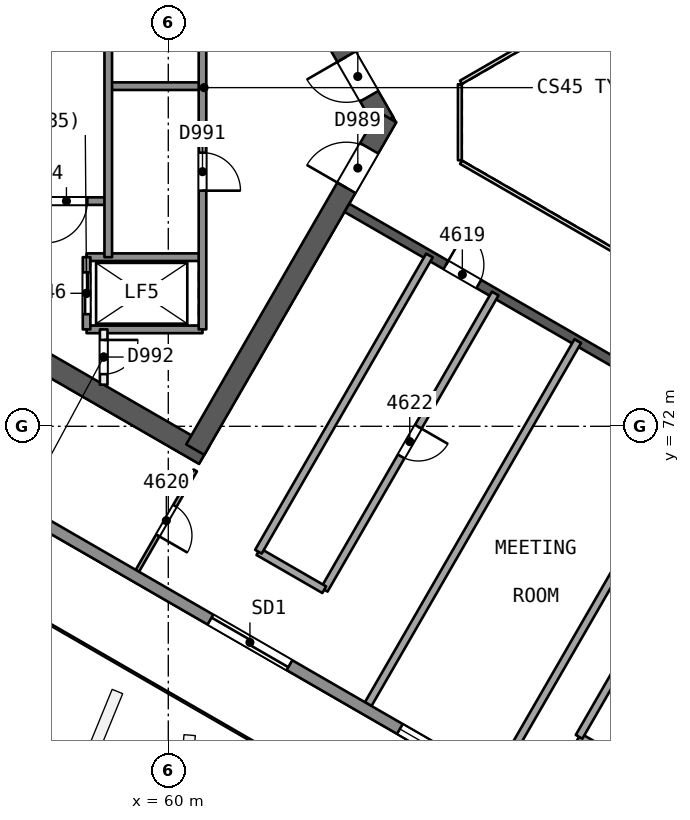
"""IFC4 building model, lengths in metres.
Left out: names, types, materials, properties, quantities, classifications, styles, units other than length and angle.
Written with IfcOpenShell. Run it as: python <this file> out.ifc"""

import sys

from ifc_helpers import new_model, si_unit, direction, frame, frame_2d, origin, place, context, subcontext, project, spatial, rectangle, extrude, element, fill, save


model = new_model("IFC4")
c1 = context("Model", 3, precision=1e-05, world=origin(), true_north=direction((0.0, 1.0)))
c2 = subcontext(c1, "Body", "Model", "MODEL_VIEW")
j1 = project(units=[si_unit("LENGTHUNIT", "METRE"), si_unit("PLANEANGLEUNIT", "RADIAN")], contexts=[c1])
p1 = place(None, origin())
s1 = spatial("IfcSite", under=j1, at=p1, CompositionType="ELEMENT")
p2 = place(p1, origin())
s2 = spatial("IfcBuilding", under=s1, at=p2, CompositionType="ELEMENT")
p3 = place(p2, frame((0.0, 0.0, 189.6)))
s3 = spatial("IfcBuildingStorey", under=s2, at=p3, CompositionType="ELEMENT", Elevation=189.6)
p4 = place(p3, frame((65.682, 80.0, 0.0), z_axis=(0.0, 0.0, 1.0), x_axis=(-0.500000202252, 0.866025287014, 0.0)))
e1 = element("IfcWall", 1, at=p4, inside=s3, PredefinedType="SHEAR", context=c2, shape_type="SweptSolid", body=[
    extrude(rectangle(XDim=10.221, YDim=0.55, at=frame_2d((5.111, 0.0))), origin(), (0.0, 0.0, 1.0), 3.7),
])
p5 = place(p4, frame((0.791, 0.0, 0.0)))
e2 = element("IfcOpeningElement", 2, at=p5, cuts=e1, PredefinedType="OPENING", context=c2, shape_type="SweptSolid", body=[
    extrude(rectangle(XDim=1.2, YDim=2.1, at=frame_2d((0.6, 1.05))), frame((0.0, 0.286, 0.0), z_axis=(0.0, -1.0, 0.0), x_axis=(1.0, 0.0, 0.0)), (0.0, 0.0, 1.0), 0.571),
])
p6 = place(p3, frame((60.709, 88.614, 0.0), z_axis=(0.0, 0.0, 1.0), x_axis=(-0.866020164116, -0.500009075263, 0.0)))
e3 = element("IfcWall", 3, at=p6, inside=s3, PredefinedType="SHEAR", context=c2, shape_type="SweptSolid", body=[
    extrude(rectangle(XDim=14.058, YDim=0.55, at=frame_2d((7.029, 0.0))), origin(), (0.0, 0.0, 1.0), 3.7),
])
p7 = place(p3, frame((48.672, 78.336, 0.0), z_axis=(0.0, 0.0, 1.0), x_axis=(0.866023530946, -0.500003243837, 0.0)))
e4 = element("IfcWall", 4, at=p7, inside=s3, PredefinedType="SHEAR", context=c2, shape_type="SweptSolid", body=[
    extrude(rectangle(XDim=14.175, YDim=0.55, at=frame_2d((7.087, 0.0))), origin(), (0.0, 0.0, 1.0), 3.7),
])
p8 = place(p3, frame((60.709, 71.386, 0.0), z_axis=(0.0, 0.0, 1.0), x_axis=(0.500015938302, 0.866016201606, 0.0)))
e5 = element("IfcWall", 5, at=p8, inside=s3, PredefinedType="SHEAR", context=c2, shape_type="SweptSolid", body=[
    extrude(rectangle(XDim=10.105, YDim=0.55, at=frame_2d((5.053, 0.0))), origin(), (0.0, 0.0, 1.0), 3.7),
])
p9 = place(p8, frame((7.955, 0.0, 0.0)))
e6 = element("IfcOpeningElement", 6, at=p9, cuts=e5, PredefinedType="OPENING", context=c2, shape_type="SweptSolid", body=[
    extrude(rectangle(XDim=1.2, YDim=2.1, at=frame_2d((0.6, 1.05))), frame((0.0, 0.286, 0.0), z_axis=(0.0, -1.0, 0.0), x_axis=(1.0, 0.0, 0.0)), (0.0, 0.0, 1.0), 0.571),
])
p10 = place(p3, frame((64.7, 77.748, 0.0), z_axis=(0.0, 0.0, 1.0), x_axis=(0.866026492143, -0.499998114903, 0.0)))
e7 = element("IfcWall", 7, at=p10, inside=s3, PredefinedType="SHEAR", context=c2, shape_type="SweptSolid", body=[
    extrude(rectangle(XDim=15.588, YDim=0.25, at=frame_2d((7.794, 0.0))), origin(), (0.0, 0.0, 1.0), 3.25),
])
p11 = place(p10, frame((3.007, 0.0, 0.0)))
e8 = element("IfcOpeningElement", 8, at=p11, cuts=e7, PredefinedType="OPENING", context=c2, shape_type="SweptSolid", body=[
    extrude(rectangle(XDim=1.0, YDim=2.1, at=frame_2d((0.5, 1.05))), frame((0.0, 0.135, 0.0), z_axis=(0.0, -1.0, 0.0), x_axis=(1.0, 0.0, 0.0)), (0.0, 0.0, 1.0), 0.271),
])
p12 = place(p10, frame((8.363, 0.0, 0.0)))
e9 = element("IfcOpeningElement", 9, at=p12, cuts=e7, PredefinedType="OPENING", context=c2, shape_type="SweptSolid", body=[
    extrude(rectangle(XDim=1.2, YDim=2.4, at=frame_2d((0.6, 1.2))), frame((0.0, 0.135, 0.0), z_axis=(0.0, -1.0, 0.0), x_axis=(1.0, 0.0, 0.0)), (0.0, 0.0, 1.0), 0.271),
])
p13 = place(p10, frame((12.75, 0.0, 0.0)))
e10 = element("IfcOpeningElement", 10, at=p13, cuts=e7, PredefinedType="OPENING", context=c2, shape_type="SweptSolid", body=[
    extrude(rectangle(XDim=1.0, YDim=2.1, at=frame_2d((0.5, 1.05))), frame((0.0, 0.135, 0.0), z_axis=(0.0, -1.0, 0.0), x_axis=(1.0, 0.0, 0.0)), (0.0, 0.0, 1.0), 0.271),
])
p14 = place(p3, frame((60.71, 70.838, 0.0), z_axis=(0.0, 0.0, 1.0), x_axis=(-0.499978833458, -0.866037623948, 0.0)))
e11 = element("IfcWall", 11, at=p14, inside=s3, PredefinedType="PARTITIONING", context=c2, shape_type="SweptSolid", body=[
    extrude(rectangle(XDim=3.05, YDim=0.1, at=frame_2d((1.525, 0.0))), origin(), (0.0, 0.0, 1.0), 3.25),
])
p15 = place(p14, frame((1.075, 0.0, 0.0)))
e12 = element("IfcOpeningElement", 12, at=p15, cuts=e11, PredefinedType="OPENING", context=c2, shape_type="SweptSolid", body=[
    extrude(rectangle(XDim=0.9, YDim=2.1, at=frame_2d((0.45, 1.05))), frame((0.0, 0.061, 0.0), z_axis=(0.0, -1.0, 0.0), x_axis=(1.0, 0.0, 0.0)), (0.0, 0.0, 1.0), 0.121),
])
p16 = place(p3, frame((68.604, 75.495, 0.0), z_axis=(0.0, 0.0, 1.0), x_axis=(-0.5000018851, -0.866024315419, 0.0)))
e13 = element("IfcWall", 13, at=p16, inside=s3, PredefinedType="PARTITIONING", context=c2, shape_type="SweptSolid", body=[
    extrude(rectangle(XDim=9.0, YDim=0.2, at=frame_2d((4.5, 0.0))), origin(), (0.0, 0.0, 1.0), 3.25),
])
p17 = place(p16, frame((4.05, 0.0, 0.0)))
e14 = element("IfcOpeningElement", 14, at=p17, cuts=e13, PredefinedType="OPENING", context=c2, shape_type="SweptSolid", body=[
    extrude(rectangle(XDim=0.9, YDim=2.1, at=frame_2d((0.45, 1.05))), frame((0.0, 0.11, 0.0), z_axis=(0.0, -1.0, 0.0), x_axis=(1.0, 0.0, 0.0)), (0.0, 0.0, 1.0), 0.221),
])
p18 = place(p3, frame((64.104, 67.7, 0.0), z_axis=(0.0, 0.0, 1.0), x_axis=(-0.866010750942, 0.50002537861, 0.0)))
e15 = element("IfcWall", 15, at=p18, inside=s3, PredefinedType="PARTITIONING", context=c2, shape_type="SweptSolid", body=[
    extrude(rectangle(XDim=2.0, YDim=0.2, at=frame_2d((1.0, 0.0))), origin(), (0.0, 0.0, 1.0), 3.25),
])
p19 = place(p3, frame((62.372, 68.7, 0.0), z_axis=(0.0, 0.0, 1.0), x_axis=(0.5000018851, 0.866024315419, 0.0)))
e16 = element("IfcWall", 16, at=p19, inside=s3, PredefinedType="PARTITIONING", context=c2, shape_type="SweptSolid", body=[
    extrude(rectangle(XDim=9.0, YDim=0.2, at=frame_2d((4.5, 0.0))), origin(), (0.0, 0.0, 1.0), 3.25),
])
for number, where, z_axis, x_axis in (
    (17, (65.26, 64.69, 0.0), (0.0, 0.0, 1.0), (0.5, 0.866, 0.0)),
    (18, (68.635, 62.741, 0.0), (0.0, 0.0, 1.0), (0.5, 0.866, 0.0)),
):
    element("IfcWall", number, at=place(p3, frame(where, z_axis=z_axis, x_axis=x_axis)), inside=s3, PredefinedType="PARTITIONING", context=c2, shape_type="SweptSolid", body=[
        extrude(rectangle(XDim=11.029, YDim=0.2, at=frame_2d((5.514, 0.0))), origin(), (0.0, 0.0, 1.0), 3.25),
    ])
p20 = place(p3, frame((72.541, 62.829, 0.0), z_axis=(0.0, 0.0, 1.0), x_axis=(-0.866010750942, 0.50002537861, 0.0)))
e19 = element("IfcWall", 19, at=p20, inside=s3, PredefinedType="PARTITIONING", context=c2, shape_type="SweptSolid", body=[
    extrude(rectangle(XDim=2.0, YDim=0.2, at=frame_2d((1.0, 0.0))), origin(), (0.0, 0.0, 1.0), 3.25),
])
p21 = place(p3, frame((70.809, 63.829, 0.0), z_axis=(0.0, 0.0, 1.0), x_axis=(0.5000018851, 0.866024315419, 0.0)))
e20 = element("IfcWall", 20, at=p21, inside=s3, PredefinedType="PARTITIONING", context=c2, shape_type="SweptSolid", body=[
    extrude(rectangle(XDim=9.0, YDim=0.2, at=frame_2d((4.5, 0.0))), origin(), (0.0, 0.0, 1.0), 3.25),
])
p22 = place(p3, frame((88.621, 51.031, 0.0), z_axis=(0.0, 0.0, 1.0), x_axis=(-0.866025007541, 0.500000686313, 0.0)))
e21 = element("IfcWall", 21, at=p22, inside=s3, PredefinedType="SOLIDWALL", context=c2, shape_type="SweptSolid", body=[
    extrude(rectangle(XDim=52.562, YDim=0.3, at=frame_2d((26.281, 0.0))), origin(), (0.0, 0.0, 1.0), 3.25),
])
p23 = place(p22, frame((29.367, 0.0, 0.0)))
e22 = element("IfcOpeningElement", 22, at=p23, cuts=e21, PredefinedType="OPENING", context=c2, shape_type="SweptSolid", body=[
    extrude(rectangle(XDim=2.4, YDim=2.4, at=frame_2d((1.2, 1.2))), frame((0.0, 0.161, 0.0), z_axis=(0.0, -1.0, 0.0), x_axis=(1.0, 0.0, 0.0)), (0.0, 0.0, 1.0), 0.321),
])
p24 = place(p22, frame((40.864, 0.0, 0.0)))
e23 = element("IfcOpeningElement", 23, at=p24, cuts=e21, PredefinedType="OPENING", context=c2, shape_type="SweptSolid", body=[
    extrude(rectangle(XDim=2.4, YDim=2.4, at=frame_2d((1.2, 1.2))), frame((0.0, 0.161, 0.0), z_axis=(0.0, -1.0, 0.0), x_axis=(1.0, 0.0, 0.0)), (0.0, 0.0, 1.0), 0.321),
])
p25 = place(p22, frame((19.625, 0.0, 0.0)))
e24 = element("IfcOpeningElement", 24, at=p25, cuts=e21, PredefinedType="OPENING", context=c2, shape_type="SweptSolid", body=[
    extrude(rectangle(XDim=2.4, YDim=2.4, at=frame_2d((1.2, 1.2))), frame((0.0, 0.161, 0.0), z_axis=(0.0, -1.0, 0.0), x_axis=(1.0, 0.0, 0.0)), (0.0, 0.0, 1.0), 0.321),
])
p26 = place(p22, frame((9.277, 0.0, 0.0)))
e25 = element("IfcOpeningElement", 25, at=p26, cuts=e21, PredefinedType="OPENING", context=c2, shape_type="SweptSolid", body=[
    extrude(rectangle(XDim=2.4, YDim=2.4, at=frame_2d((1.2, 1.2))), frame((0.0, 0.161, 0.0), z_axis=(0.0, -1.0, 0.0), x_axis=(1.0, 0.0, 0.0)), (0.0, 0.0, 1.0), 0.321),
])
p27 = place(p22, frame((24.212, 0.0, 0.9)))
e26 = element("IfcOpeningElement", 26, at=p27, cuts=e21, PredefinedType="OPENING", context=c2, shape_type="SweptSolid", body=[
    extrude(rectangle(XDim=1.8, YDim=1.5, at=frame_2d((0.9, 0.75))), frame((0.0, 0.161, 0.0), z_axis=(0.0, -1.0, 0.0), x_axis=(1.0, 0.0, 0.0)), (0.0, 0.0, 1.0), 0.321),
])
p28 = place(p3, frame((60.9, 80.95, 0.0), z_axis=(0.0, 0.0, 1.0), x_axis=(-1.0, 0.0, 0.0)))
e27 = element("IfcWall", 27, at=p28, inside=s3, PredefinedType="SOLIDWALL", context=c2, shape_type="SweptSolid", body=[
    extrude(rectangle(XDim=2.48, YDim=0.2, at=frame_2d((1.24, 0.0))), origin(), (0.0, 0.0, 1.0), 3.25),
])
p29 = place(p3, frame((58.42, 77.925, 0.0), z_axis=(0.0, 0.0, 1.0), x_axis=(-1.0, 0.0, 0.0)))
e28 = element("IfcWall", 28, at=p29, inside=s3, PredefinedType="SOLIDWALL", context=c2, shape_type="SweptSolid", body=[
    extrude(rectangle(XDim=7.7, YDim=0.2, at=frame_2d((3.85, 0.0))), origin(), (0.0, 0.0, 1.0), 3.25),
])
p30 = place(p29, frame((0.55, 0.0, 0.0)))
e29 = element("IfcOpeningElement", 29, at=p30, cuts=e28, PredefinedType="OPENING", context=c2, shape_type="SweptSolid", body=[
    extrude(rectangle(XDim=1.1, YDim=2.1, at=frame_2d((0.55, 1.05))), frame((0.0, 0.11, 0.0), z_axis=(0.0, -1.0, 0.0), x_axis=(1.0, 0.0, 0.0)), (0.0, 0.0, 1.0), 0.221),
])
for number, where, z_axis, x_axis in (
    (30, (60.9, 76.45, 0.0), (0.0, 0.0, 1.0), (-1.0, 0.0, 0.0)),
    (31, (60.9, 74.55, 0.0), (0.0, 0.0, 1.0), (-1.0, 0.0, 0.0)),
):
    element("IfcWall", number, at=place(p3, frame(where, z_axis=z_axis, x_axis=x_axis)), inside=s3, PredefinedType="SOLIDWALL", context=c2, shape_type="SweptSolid", body=[
        extrude(rectangle(XDim=3.05, YDim=0.2, at=frame_2d((1.525, 0.0))), origin(), (0.0, 0.0, 1.0), 3.25),
    ])
p31 = place(p3, frame((60.9, 85.45, 0.0), z_axis=(0.0, 0.0, 1.0), x_axis=(0.0, -1.0, 0.0)))
e32 = element("IfcWall", 32, at=p31, inside=s3, PredefinedType="SOLIDWALL", context=c2, shape_type="SweptSolid", body=[
    extrude(rectangle(XDim=10.9, YDim=0.2, at=frame_2d((5.45, 0.0))), origin(), (0.0, 0.0, 1.0), 3.25),
])
p32 = place(p31, frame((1.75, 0.0, 0.0)))
e33 = element("IfcOpeningElement", 33, at=p32, cuts=e32, PredefinedType="OPENING", context=c2, shape_type="SweptSolid", body=[
    extrude(rectangle(XDim=1.0, YDim=2.1, at=frame_2d((0.5, 1.05))), frame((0.0, 0.11, 0.0), z_axis=(0.0, -1.0, 0.0), x_axis=(1.0, 0.0, 0.0)), (0.0, 0.0, 1.0), 0.221),
])
p33 = place(p31, frame((6.25, 0.0, 0.0)))
e34 = element("IfcOpeningElement", 34, at=p33, cuts=e32, PredefinedType="OPENING", context=c2, shape_type="SweptSolid", body=[
    extrude(rectangle(XDim=1.0, YDim=2.1, at=frame_2d((0.5, 1.05))), frame((0.0, 0.11, 0.0), z_axis=(0.0, -1.0, 0.0), x_axis=(1.0, 0.0, 0.0)), (0.0, 0.0, 1.0), 0.221),
])
p34 = place(p3, frame((58.42, 86.974, 0.0), z_axis=(0.0, 0.0, 1.0), x_axis=(0.0, -1.0, 0.0)))
e35 = element("IfcWall", 35, at=p34, inside=s3, PredefinedType="SOLIDWALL", context=c2, shape_type="SweptSolid", body=[
    extrude(rectangle(XDim=10.524, YDim=0.2, at=frame_2d((5.262, 0.0))), origin(), (0.0, 0.0, 1.0), 3.25),
])
p35 = place(p34, frame((0.312, 0.0, 0.0)))
e36 = element("IfcOpeningElement", 36, at=p35, cuts=e35, PredefinedType="OPENING", context=c2, shape_type="SweptSolid", body=[
    extrude(rectangle(XDim=0.9, YDim=2.1, at=frame_2d((0.45, 1.05))), frame((0.0, 0.11, 0.0), z_axis=(0.0, -1.0, 0.0), x_axis=(1.0, 0.0, 0.0)), (0.0, 0.0, 1.0), 0.221),
])
p36 = place(p3, frame((58.3, 74.55, 0.0), z_axis=(0.0, 0.0, 1.0), x_axis=(0.0, -1.0, 0.0)))
e37 = element("IfcWall", 37, at=p36, inside=s3, PredefinedType="PARTITIONING", context=c2, shape_type="SweptSolid", body=[
    extrude(rectangle(XDim=1.455, YDim=0.2, at=frame_2d((0.728, 0.0))), origin(), (0.0, 0.0, 1.0), 3.25),
])
p37 = place(p36, frame((0.278, 0.0, 0.0)))
e38 = element("IfcOpeningElement", 38, at=p37, cuts=e37, PredefinedType="OPENING", context=c2, shape_type="SweptSolid", body=[
    extrude(rectangle(XDim=0.9, YDim=2.1, at=frame_2d((0.45, 1.05))), frame((0.0, 0.11, 0.0), z_axis=(0.0, -1.0, 0.0), x_axis=(1.0, 0.0, 0.0)), (0.0, 0.0, 1.0), 0.221),
])
p38 = place(p3, frame((57.85, 76.45, 0.0), z_axis=(0.0, 0.0, 1.0), x_axis=(0.0, -1.0, 0.0)))
e39 = element("IfcWall", 39, at=p38, inside=s3, PredefinedType="SOLIDWALL", context=c2, shape_type="SweptSolid", body=[
    extrude(rectangle(XDim=1.9, YDim=0.2, at=frame_2d((0.95, 0.0))), origin(), (0.0, 0.0, 1.0), 3.25),
])
p39 = place(p38, frame((0.4, 0.0, 0.0)))
e40 = element("IfcOpeningElement", 40, at=p39, cuts=e39, PredefinedType="OPENING", context=c2, shape_type="SweptSolid", body=[
    extrude(rectangle(XDim=1.1, YDim=2.1, at=frame_2d((0.55, 1.05))), frame((0.0, 0.11, 0.0), z_axis=(0.0, -1.0, 0.0), x_axis=(1.0, 0.0, 0.0)), (0.0, 0.0, 1.0), 0.221),
])
p40 = place(p3, frame((77.738, 86.846, 0.0), z_axis=(0.0, 0.0, 1.0), x_axis=(-0.866026658274, -0.499997827154, 0.0)))
e41 = element("IfcWall", 41, at=p40, inside=s3, PredefinedType="PARTITIONING", context=c2, shape_type="SweptSolid", body=[
    extrude(rectangle(XDim=11.588, YDim=0.1, at=frame_2d((5.794, 0.0))), origin(), (0.0, 0.0, 1.0), 3.25),
])
p41 = place(p3, frame((67.672, 81.0, 0.0), z_axis=(0.0, 0.0, 1.0), x_axis=(0.0, -1.0, 0.0)))
e42 = element("IfcWall", 42, at=p41, inside=s3, PredefinedType="PARTITIONING", context=c2, shape_type="SweptSolid", body=[
    extrude(rectangle(XDim=2.0, YDim=0.1, at=frame_2d((1.0, 0.0))), origin(), (0.0, 0.0, 1.0), 3.25),
])
p42 = place(p3, frame((67.702, 78.948, 0.0), z_axis=(0.0, 0.0, 1.0), x_axis=(0.866026658274, -0.499997827154, 0.0)))
e43 = element("IfcWall", 43, at=p42, inside=s3, PredefinedType="PARTITIONING", context=c2, shape_type="SweptSolid", body=[
    extrude(rectangle(XDim=11.588, YDim=0.1, at=frame_2d((5.794, 0.0))), origin(), (0.0, 0.0, 1.0), 3.25),
])
p43 = place(p11, origin())
e44 = element("IfcDoor", 44, at=p43, inside=s3, OperationType="SINGLE_SWING_LEFT", PredefinedType="NOTDEFINED", context=c2, shape_type="SweptSolid", body=[
    extrude(rectangle(XDim=1.0, YDim=2.1, at=frame_2d((0.5, 1.05))), frame((0.0, 0.025, 0.0), z_axis=(0.0, -1.0, 0.0), x_axis=(1.0, 0.0, 0.0)), (0.0, 0.0, 1.0), 0.05),
])
fill(e8, e44)
p44 = place(p15, origin())
e45 = element("IfcDoor", 45, at=p44, inside=s3, OperationType="SINGLE_SWING_RIGHT", PredefinedType="NOTDEFINED", context=c2, shape_type="SweptSolid", body=[
    extrude(rectangle(XDim=0.9, YDim=2.1, at=frame_2d((0.45, 1.05))), frame((0.0, 0.025, 0.0), z_axis=(0.0, -1.0, 0.0), x_axis=(1.0, 0.0, 0.0)), (0.0, 0.0, 1.0), 0.05),
])
fill(e12, e45)
p45 = place(p17, origin())
e46 = element("IfcDoor", 46, at=p45, inside=s3, OperationType="SINGLE_SWING_LEFT", PredefinedType="NOTDEFINED", context=c2, shape_type="SweptSolid", body=[
    extrude(rectangle(XDim=0.9, YDim=2.1, at=frame_2d((0.45, 1.05))), frame((0.0, 0.025, 0.0), z_axis=(0.0, -1.0, 0.0), x_axis=(1.0, 0.0, 0.0)), (0.0, 0.0, 1.0), 0.05),
])
fill(e14, e46)
p46 = place(p23, origin())
e47 = element("IfcDoor", 47, at=p46, inside=s3, OperationType="SLIDING_TO_LEFT", PredefinedType="NOTDEFINED", context=c2, shape_type="SweptSolid", body=[
    extrude(rectangle(XDim=2.4, YDim=2.4, at=frame_2d((1.2, 1.2))), frame((0.0, 0.025, 0.0), z_axis=(0.0, -1.0, 0.0), x_axis=(1.0, 0.0, 0.0)), (0.0, 0.0, 1.0), 0.05),
])
fill(e22, e47)
p47 = place(p27, origin())
e48 = element("IfcWindow", 48, at=p47, inside=s3, PartitioningType="SINGLE_PANEL", PredefinedType="WINDOW", context=c2, shape_type="SweptSolid", body=[
    extrude(rectangle(XDim=1.8, YDim=1.5, at=frame_2d((0.9, 0.75))), frame((0.0, 0.03, 0.0), z_axis=(0.0, -1.0, 0.0), x_axis=(1.0, 0.0, 0.0)), (0.0, 0.0, 1.0), 0.06),
])
fill(e26, e48)
p48 = place(p5, origin())
e49 = element("IfcDoor", 49, at=p48, inside=s3, OperationType="SINGLE_SWING_RIGHT", PredefinedType="NOTDEFINED", context=c2, shape_type="SweptSolid", body=[
    extrude(rectangle(XDim=1.2, YDim=2.1, at=frame_2d((0.6, 1.05))), frame((0.0, 0.025, 0.0), z_axis=(0.0, -1.0, 0.0), x_axis=(1.0, 0.0, 0.0)), (0.0, 0.0, 1.0), 0.05),
])
fill(e2, e49)
p49 = place(p9, origin())
e50 = element("IfcDoor", 50, at=p49, inside=s3, OperationType="SINGLE_SWING_LEFT", PredefinedType="NOTDEFINED", context=c2, shape_type="SweptSolid", body=[
    extrude(rectangle(XDim=1.2, YDim=2.1, at=frame_2d((0.6, 1.05))), frame((0.0, 0.025, 0.0), z_axis=(0.0, -1.0, 0.0), x_axis=(1.0, 0.0, 0.0)), (0.0, 0.0, 1.0), 0.05),
])
fill(e6, e50)
p50 = place(p39, origin())
e51 = element("IfcDoor", 51, at=p50, inside=s3, OperationType="SLIDING_TO_RIGHT", PredefinedType="NOTDEFINED", context=c2, shape_type="SweptSolid", body=[
    extrude(rectangle(XDim=1.1, YDim=2.1, at=frame_2d((0.55, 1.05))), frame((0.0, 0.025, 0.0), z_axis=(0.0, -1.0, 0.0), x_axis=(1.0, 0.0, 0.0)), (0.0, 0.0, 1.0), 0.05),
])
fill(e40, e51)
p51 = place(p33, origin())
e52 = element("IfcDoor", 52, at=p51, inside=s3, OperationType="SINGLE_SWING_RIGHT", PredefinedType="NOTDEFINED", context=c2, shape_type="SweptSolid", body=[
    extrude(rectangle(XDim=1.0, YDim=2.1, at=frame_2d((0.5, 1.05))), frame((0.0, 0.025, 0.0), z_axis=(0.0, -1.0, 0.0), x_axis=(1.0, 0.0, 0.0)), (0.0, 0.0, 1.0), 0.05),
])
fill(e34, e52)
p52 = place(p37, origin())
e53 = element("IfcDoor", 53, at=p52, inside=s3, OperationType="SINGLE_SWING_LEFT", PredefinedType="NOTDEFINED", context=c2, shape_type="SweptSolid", body=[
    extrude(rectangle(XDim=0.9, YDim=2.1, at=frame_2d((0.45, 1.05))), frame((0.0, 0.025, 0.0), z_axis=(0.0, -1.0, 0.0), x_axis=(1.0, 0.0, 0.0)), (0.0, 0.0, 1.0), 0.05),
])
fill(e38, e53)
p53 = place(p30, origin())
e54 = element("IfcDoor", 54, at=p53, inside=s3, OperationType="SINGLE_SWING_RIGHT", PredefinedType="NOTDEFINED", context=c2, shape_type="SweptSolid", body=[
    extrude(rectangle(XDim=1.1, YDim=2.1, at=frame_2d((0.55, 1.05))), frame((0.0, 0.025, 0.0), z_axis=(0.0, -1.0, 0.0), x_axis=(1.0, 0.0, 0.0)), (0.0, 0.0, 1.0), 0.05),
])
fill(e29, e54)
save(model, sys.argv[1])
